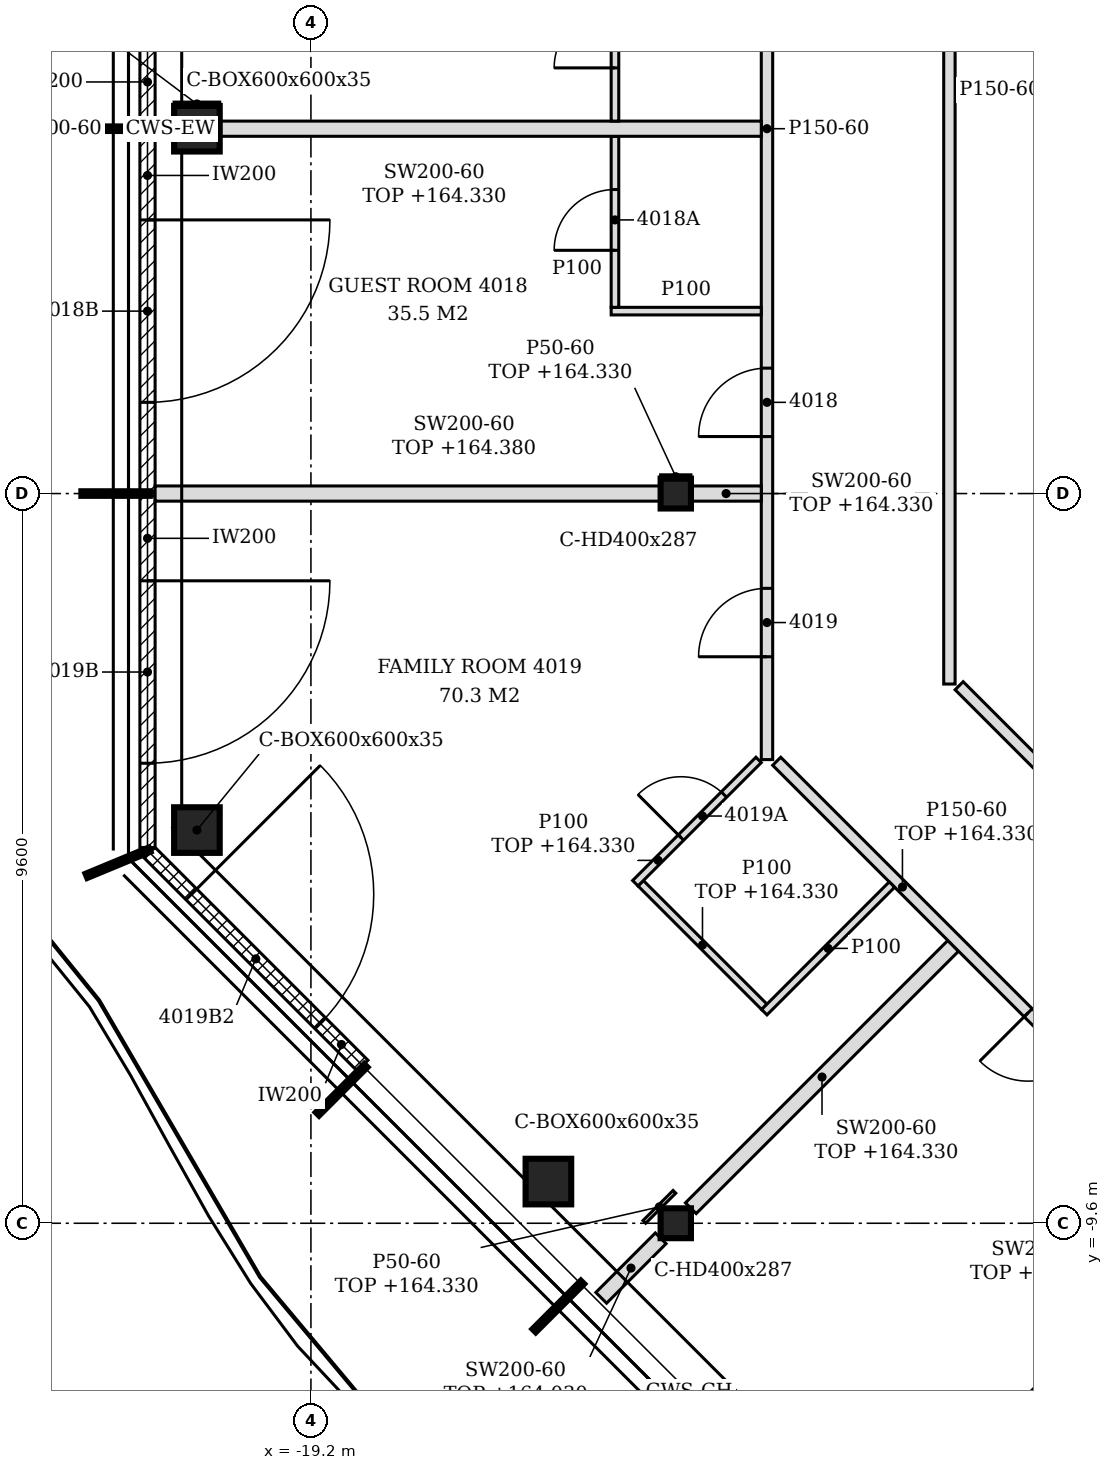
"""IFC4 building model, lengths in metres.
Left out: names, types, materials, properties, quantities, classifications, styles, units other than length and angle.
Written with IfcOpenShell. Run it as: python <this file> out.ifc"""

import sys

from ifc_helpers import new_model, si_unit, direction, frame, frame_2d, origin, origin_2d, place, context, subcontext, project, spatial, polyline, rectangle, hollow_rectangle, i_section, outline, extrude, element, fill, save


model = new_model("IFC4")
c1 = context("Model", 3, precision=1e-05, world=origin(), true_north=direction((0.0, 1.0)))
c2 = subcontext(c1, "Body", "Model", "MODEL_VIEW")
j1 = project(units=[si_unit("LENGTHUNIT", "METRE"), si_unit("PLANEANGLEUNIT", "RADIAN")], contexts=[c1])
p1 = place(None, origin())
s1 = spatial("IfcSite", under=j1, at=p1, CompositionType="ELEMENT")
p2 = place(p1, origin())
s2 = spatial("IfcBuilding", under=s1, at=p2, CompositionType="ELEMENT")
p3 = place(p2, frame((0.0, 0.0, 161.4)))
s3 = spatial("IfcBuildingStorey", under=s2, at=p3, CompositionType="ELEMENT", Elevation=161.4)
for number, where, z_axis, x_axis in (
    (1, (-20.7, 4.8, -0.15), (0.0, 0.0, 1.0), (1.0, 0.0, 0.0)),
    (2, (-20.7, -4.427, -0.15), (0.0, 0.0, 1.0), (1.0, 0.0, 0.0)),
    (3, (-16.076, -9.052, -0.15), (0.0, 0.0, 1.0), (1.0, 0.0, 0.0)),
):
    element("IfcColumn", number, at=place(p3, frame(where, z_axis=z_axis, x_axis=x_axis)), inside=s3, PredefinedType="COLUMN", context=c2, shape_type="SweptSolid", body=[
        extrude(hollow_rectangle(XDim=0.6, YDim=0.6, WallThickness=0.035, at=origin_2d()), origin(), (0.0, 0.0, 1.0), 3.6),
    ])
for number, where, z_axis, x_axis in (
    (4, (-14.4, -9.6, -0.15), (0.0, 0.0, 1.0), (1.0, 0.0, 0.0)),
    (5, (-14.4, 0.0, -0.15), (0.0, 0.0, 1.0), (1.0, 0.0, 0.0)),
):
    element("IfcColumn", number, at=place(p3, frame(where, z_axis=z_axis, x_axis=x_axis)), inside=s3, PredefinedType="COLUMN", context=c2, shape_type="SweptSolid", body=[
        extrude(i_section(OverallWidth=0.399, OverallDepth=0.393, WebThickness=0.023, FlangeThickness=0.037, FilletRadius=0.015, at=origin_2d()), origin(), (0.0, 0.0, 1.0), 3.6),
    ])
p4 = place(p3, frame((-21.35, 9.57, 0.0), z_axis=(0.0, 0.0, 1.0), x_axis=(0.0, -1.0, 0.0)))
e6 = element("IfcWall", 6, at=p4, inside=s3, PredefinedType="NOTDEFINED", context=c2, shape_type="SweptSolid", body=[
    extrude(rectangle(XDim=4.74, YDim=0.2, at=frame_2d((2.37, 0.0))), origin(), (0.0, 0.0, 1.0), 3.45),
])
p5 = place(p4, frame((1.17, 0.0, 0.0)))
e7 = element("IfcOpeningElement", 7, at=p5, cuts=e6, PredefinedType="OPENING", context=c2, shape_type="SweptSolid", body=[
    extrude(rectangle(XDim=2.4, YDim=2.4, at=frame_2d((1.2, 1.2))), frame((0.0, 0.11, 0.0), z_axis=(0.0, -1.0, 0.0), x_axis=(1.0, 0.0, 0.0)), (0.0, 0.0, 1.0), 0.22),
])
p6 = place(p3, frame((-21.35, 4.77, 0.0), z_axis=(0.0, 0.0, 1.0), x_axis=(0.0, -1.0, 0.0)))
e8 = element("IfcWall", 8, at=p6, inside=s3, PredefinedType="NOTDEFINED", context=c2, shape_type="SweptSolid", body=[
    extrude(rectangle(XDim=4.74, YDim=0.2, at=frame_2d((2.37, 0.0))), origin(), (0.0, 0.0, 1.0), 3.45),
])
p7 = place(p6, frame((1.17, 0.0, 0.0)))
e9 = element("IfcOpeningElement", 9, at=p7, cuts=e8, PredefinedType="OPENING", context=c2, shape_type="SweptSolid", body=[
    extrude(rectangle(XDim=2.4, YDim=2.4, at=frame_2d((1.2, 1.2))), frame((0.0, 0.11, 0.0), z_axis=(0.0, -1.0, 0.0), x_axis=(1.0, 0.0, 0.0)), (0.0, 0.0, 1.0), 0.22),
])
p8 = place(p3, frame((-21.35, -0.03, 0.0), z_axis=(0.0, 0.0, 1.0), x_axis=(0.0, -1.0, 0.0)))
e10 = element("IfcWall", 10, at=p8, inside=s3, PredefinedType="NOTDEFINED", context=c2, shape_type="SweptSolid", body=[
    extrude(rectangle(XDim=4.626, YDim=0.2, at=frame_2d((2.313, 0.0))), origin(), (0.0, 0.0, 1.0), 3.45),
])
p9 = place(p8, frame((1.118, 0.0, 0.0)))
e11 = element("IfcOpeningElement", 11, at=p9, cuts=e10, PredefinedType="OPENING", context=c2, shape_type="SweptSolid", body=[
    extrude(rectangle(XDim=2.4, YDim=2.4, at=frame_2d((1.2, 1.2))), frame((0.0, 0.11, 0.0), z_axis=(0.0, -1.0, 0.0), x_axis=(1.0, 0.0, 0.0)), (0.0, 0.0, 1.0), 0.22),
])
p10 = place(p3, frame((-21.322, -4.725, 0.0), z_axis=(0.0, 0.0, 1.0), x_axis=(0.707106781187, -0.707106781187, 0.0)))
e12 = element("IfcWall", 12, at=p10, inside=s3, PredefinedType="NOTDEFINED", context=c2, shape_type="SweptSolid", body=[
    extrude(rectangle(XDim=3.962, YDim=0.2, at=frame_2d((1.981, 0.0))), origin(), (0.0, 0.0, 1.0), 3.45),
])
p11 = place(p10, frame((0.775, 0.0, 0.0)))
e13 = element("IfcOpeningElement", 13, at=p11, cuts=e12, PredefinedType="OPENING", context=c2, shape_type="SweptSolid", body=[
    extrude(rectangle(XDim=2.4, YDim=2.4, at=frame_2d((1.2, 1.2))), frame((0.0, 0.11, 0.0), z_axis=(0.0, -1.0, 0.0), x_axis=(1.0, 0.0, 0.0)), (0.0, 0.0, 1.0), 0.22),
])
p12 = place(p3, frame((-11.152, -13.375, 0.0), z_axis=(0.0, 0.0, 1.0), x_axis=(0.707106781187, 0.707106781187, 0.0)))
e14 = element("IfcWall", 14, at=p12, inside=s3, PredefinedType="PARTITIONING", context=c2, shape_type="SweptSolid", body=[
    extrude(rectangle(XDim=6.83, YDim=0.2, at=frame_2d((3.415, 0.0))), origin(), (0.0, 0.0, 1.0), 2.93),
])
p13 = place(p3, frame((-15.381, -10.581, 0.0), z_axis=(0.0, 0.0, 1.0), x_axis=(0.707217034054, 0.706996511125, 0.0)))
e15 = element("IfcWall", 15, at=p13, inside=s3, PredefinedType="PARTITIONING", context=c2, shape_type="SweptSolid", body=[
    extrude(rectangle(XDim=1.107, YDim=0.2, at=frame_2d((0.554, 0.0))), origin(), (0.0, 0.0, 1.0), 2.63),
])
p14 = place(p3, frame((-14.202, -9.402, 0.0), z_axis=(0.0, 0.0, 1.0), x_axis=(0.707081776084, 0.707131785404, 0.0)))
e16 = element("IfcWall", 16, at=p14, inside=s3, PredefinedType="PARTITIONING", context=c2, shape_type="SweptSolid", body=[
    extrude(rectangle(XDim=4.882, YDim=0.2, at=frame_2d((2.441, 0.0))), origin(), (0.0, 0.0, 1.0), 2.93),
])
p15 = place(p3, frame((-8.322, -8.272, 0.0), z_axis=(0.0, 0.0, 1.0), x_axis=(-0.707106781187, 0.707106781187, 0.0)))
e17 = element("IfcWall", 17, at=p15, inside=s3, PredefinedType="PARTITIONING", context=c2, shape_type="SweptSolid", body=[
    extrude(rectangle(XDim=6.718, YDim=0.15, at=frame_2d((3.359, 0.0))), origin(), (0.0, 0.0, 1.0), 2.93),
])
p16 = place(p15, frame((1.139, 0.0, 0.0)))
e18 = element("IfcOpeningElement", 18, at=p16, cuts=e17, PredefinedType="OPENING", context=c2, shape_type="SweptSolid", body=[
    extrude(rectangle(XDim=0.9, YDim=2.1, at=frame_2d((0.45, 1.05))), frame((0.0, 0.085, 0.0), z_axis=(0.0, -1.0, 0.0), x_axis=(1.0, 0.0, 0.0)), (0.0, 0.0, 1.0), 0.17),
])
p17 = place(p3, frame((-13.235, -6.753, 0.0), z_axis=(0.0, 0.0, 1.0), x_axis=(-0.707106781187, 0.707106781187, 0.0)))
e19 = element("IfcWall", 19, at=p17, inside=s3, PredefinedType="PARTITIONING", context=c2, shape_type="SweptSolid", body=[
    extrude(rectangle(XDim=2.3, YDim=0.1, at=frame_2d((1.15, 0.0))), origin(), (0.0, 0.0, 1.0), 2.93),
])
p18 = place(p3, frame((-13.235, -6.823, 0.0), z_axis=(0.0, 0.0, 1.0), x_axis=(0.707106781187, 0.707106781187, 0.0)))
e20 = element("IfcWall", 20, at=p18, inside=s3, PredefinedType="PARTITIONING", context=c2, shape_type="SweptSolid", body=[
    extrude(rectangle(XDim=2.375, YDim=0.1, at=frame_2d((1.188, 0.0))), origin(), (0.0, 0.0, 1.0), 3.45),
])
p19 = place(p3, frame((-7.328, -5.872, 0.0), z_axis=(0.0, 0.0, 1.0), x_axis=(-0.707106781187, 0.707106781187, 0.0)))
e21 = element("IfcWall", 21, at=p19, inside=s3, PredefinedType="PARTITIONING", context=c2, shape_type="SweptSolid", body=[
    extrude(rectangle(XDim=4.729, YDim=0.15, at=frame_2d((2.365, 0.0))), origin(), (0.0, 0.0, 1.0), 2.93),
])
p20 = place(p3, frame((-14.932, -5.126, 0.0), z_axis=(0.0, 0.0, 1.0), x_axis=(0.707106781187, 0.707106781187, 0.0)))
e22 = element("IfcWall", 22, at=p20, inside=s3, PredefinedType="PARTITIONING", context=c2, shape_type="SweptSolid", body=[
    extrude(rectangle(XDim=2.294, YDim=0.1, at=frame_2d((1.147, 0.0))), origin(), (0.0, 0.0, 1.0), 2.93),
])
p21 = place(p20, frame((0.85, 0.0, 0.0)))
e23 = element("IfcOpeningElement", 23, at=p21, cuts=e22, PredefinedType="OPENING", context=c2, shape_type="SweptSolid", body=[
    extrude(rectangle(XDim=0.8, YDim=2.1, at=frame_2d((0.4, 1.05))), frame((0.0, 0.06, 0.0), z_axis=(0.0, -1.0, 0.0), x_axis=(1.0, 0.0, 0.0)), (0.0, 0.0, 1.0), 0.12),
])
p22 = place(p3, frame((-13.2, -3.5, 0.0), z_axis=(0.0, 0.0, 1.0), x_axis=(0.0, 1.0, 0.0)))
e24 = element("IfcWall", 24, at=p22, inside=s3, PredefinedType="PARTITIONING", context=c2, shape_type="SweptSolid", body=[
    extrude(outline(polyline([(0.0, 0.0), (17.634, 0.0), (17.634, 3.45), (13.2, 3.45), (13.198, 2.93), (13.0, 2.93), (12.998, 3.45), (8.4, 3.45), (8.398, 2.93), (8.2, 2.93), (8.198, 3.45), (3.6, 3.45), (3.598, 2.93), (3.4, 2.93), (3.398, 3.45), (0.0, 3.45), (0.0, 0.0)])), frame((0.0, 0.075, 0.0), z_axis=(0.0, -1.0, 0.0), x_axis=(1.0, 0.0, 0.0)), (0.0, 0.0, 1.0), 0.15),
])
p23 = place(p22, frame((15.784, 0.0, 0.0)))
e25 = element("IfcOpeningElement", 25, at=p23, cuts=e24, PredefinedType="OPENING", context=c2, shape_type="SweptSolid", body=[
    extrude(rectangle(XDim=0.9, YDim=2.1, at=frame_2d((0.45, 1.05))), frame((0.0, 0.085, 0.0), z_axis=(0.0, -1.0, 0.0), x_axis=(1.0, 0.0, 0.0)), (0.0, 0.0, 1.0), 0.17),
])
p24 = place(p22, frame((11.45, 0.0, 0.0)))
e26 = element("IfcOpeningElement", 26, at=p24, cuts=e24, PredefinedType="OPENING", context=c2, shape_type="SweptSolid", body=[
    extrude(rectangle(XDim=0.9, YDim=2.1, at=frame_2d((0.45, 1.05))), frame((0.0, 0.085, 0.0), z_axis=(0.0, -1.0, 0.0), x_axis=(1.0, 0.0, 0.0)), (0.0, 0.0, 1.0), 0.17),
])
p25 = place(p22, frame((4.25, 0.0, 0.0)))
e27 = element("IfcOpeningElement", 27, at=p25, cuts=e24, PredefinedType="OPENING", context=c2, shape_type="SweptSolid", body=[
    extrude(rectangle(XDim=0.9, YDim=2.1, at=frame_2d((0.45, 1.05))), frame((0.0, 0.085, 0.0), z_axis=(0.0, -1.0, 0.0), x_axis=(1.0, 0.0, 0.0)), (0.0, 0.0, 1.0), 0.17),
])
p26 = place(p22, frame((1.353, 0.0, 0.0)))
e28 = element("IfcOpeningElement", 28, at=p26, cuts=e24, PredefinedType="OPENING", context=c2, shape_type="SweptSolid", body=[
    extrude(rectangle(XDim=0.9, YDim=2.1, at=frame_2d((0.45, 1.05))), frame((0.0, 0.085, 0.0), z_axis=(0.0, -1.0, 0.0), x_axis=(1.0, 0.0, 0.0)), (0.0, 0.0, 1.0), 0.17),
])
p27 = place(p3, frame((-10.8, -2.506, 0.0), z_axis=(0.0, 0.0, 1.0), x_axis=(0.0, 1.0, 0.0)))
e29 = element("IfcWall", 29, at=p27, inside=s3, PredefinedType="PARTITIONING", context=c2, shape_type="SweptSolid", body=[
    extrude(outline(polyline([(0.0, 0.0), (15.631, 0.0), (15.631, 3.45), (12.206, 3.45), (12.204, 2.93), (12.006, 2.93), (12.004, 3.45), (7.406, 3.45), (7.404, 2.93), (7.206, 2.93), (7.204, 3.45), (2.606, 3.45), (2.604, 2.93), (2.406, 2.93), (2.404, 3.45), (0.0, 3.45), (0.0, 0.0)])), frame((0.0, 0.075, 0.0), z_axis=(0.0, -1.0, 0.0), x_axis=(1.0, 0.0, 0.0)), (0.0, 0.0, 1.0), 0.15),
])
p28 = place(p3, frame((-21.25, 0.0, 0.0), z_axis=(0.0, 0.0, 1.0), x_axis=(1.0, 0.0, 0.0)))
e30 = element("IfcWall", 30, at=p28, inside=s3, PredefinedType="PARTITIONING", context=c2, shape_type="SweptSolid", body=[
    extrude(outline(polyline([(0.0, 0.0), (6.65, 0.0), (6.65, 2.98), (0.7, 2.98), (0.698, 2.93), (0.4, 2.93), (0.398, 2.98), (0.0, 2.98), (0.0, 0.0)])), frame((0.0, 0.1, 0.0), z_axis=(0.0, -1.0, 0.0), x_axis=(1.0, 0.0, 0.0)), (0.0, 0.0, 1.0), 0.2),
])
p29 = place(p3, frame((-14.2, 0.0, 0.0), z_axis=(0.0, 0.0, 1.0), x_axis=(1.0, 0.0, 0.0)))
e31 = element("IfcWall", 31, at=p29, inside=s3, PredefinedType="PARTITIONING", context=c2, shape_type="SweptSolid", body=[
    extrude(rectangle(XDim=0.926, YDim=0.2, at=frame_2d((0.463, 0.0))), origin(), (0.0, 0.0, 1.0), 2.93),
])
p30 = place(p3, frame((-15.25, 2.4, 0.0), z_axis=(0.0, 0.0, 1.0), x_axis=(1.0, 0.0, 0.0)))
e32 = element("IfcWall", 32, at=p30, inside=s3, PredefinedType="PARTITIONING", context=c2, shape_type="SweptSolid", body=[
    extrude(outline(polyline([(0.0, 0.0), (1.975, 0.0), (1.975, 3.45), (1.0, 3.45), (0.998, 2.93), (0.7, 2.93), (0.698, 3.45), (0.0, 3.45), (0.0, 0.0)])), frame((0.0, 0.05, 0.0), z_axis=(0.0, -1.0, 0.0), x_axis=(1.0, 0.0, 0.0)), (0.0, 0.0, 1.0), 0.1),
])
p31 = place(p3, frame((-15.2, 2.45, 0.0), z_axis=(0.0, 0.0, 1.0), x_axis=(0.0, 1.0, 0.0)))
e33 = element("IfcWall", 33, at=p31, inside=s3, PredefinedType="PARTITIONING", context=c2, shape_type="SweptSolid", body=[
    extrude(rectangle(XDim=2.25, YDim=0.1, at=frame_2d((1.125, 0.0))), origin(), (0.0, 0.0, 1.0), 3.45),
])
p32 = place(p31, frame((0.75, 0.0, 0.0)))
e34 = element("IfcOpeningElement", 34, at=p32, cuts=e33, PredefinedType="OPENING", context=c2, shape_type="SweptSolid", body=[
    extrude(rectangle(XDim=0.8, YDim=2.1, at=frame_2d((0.4, 1.05))), frame((0.0, 0.06, 0.0), z_axis=(0.0, -1.0, 0.0), x_axis=(1.0, 0.0, 0.0)), (0.0, 0.0, 1.0), 0.12),
])
p33 = place(p3, frame((-21.25, 4.8, 0.0), z_axis=(0.0, 0.0, 1.0), x_axis=(1.0, 0.0, 0.0)))
e35 = element("IfcWall", 35, at=p33, inside=s3, PredefinedType="PARTITIONING", context=c2, shape_type="SweptSolid", body=[
    extrude(rectangle(XDim=0.25, YDim=0.2, at=frame_2d((0.125, 0.0))), origin(), (0.0, 0.0, 1.0), 3.45),
])
p34 = place(p3, frame((-20.4, 4.8, 0.0), z_axis=(0.0, 0.0, 1.0), x_axis=(1.0, 0.0, 0.0)))
e36 = element("IfcWall", 36, at=p34, inside=s3, PredefinedType="PARTITIONING", context=c2, shape_type="SweptSolid", body=[
    extrude(rectangle(XDim=7.125, YDim=0.2, at=frame_2d((3.562, 0.0))), origin(), (0.0, 0.0, 1.0), 2.93),
])
p35 = place(p3, frame((-15.2, 4.9, 0.0), z_axis=(0.0, 0.0, 1.0), x_axis=(0.0, 1.0, 0.0)))
e37 = element("IfcWall", 37, at=p35, inside=s3, PredefinedType="PARTITIONING", context=c2, shape_type="SweptSolid", body=[
    extrude(rectangle(XDim=2.25, YDim=0.1, at=frame_2d((1.125, 0.0))), origin(), (0.0, 0.0, 1.0), 3.45),
])
p36 = place(p35, frame((0.7, 0.0, 0.0)))
e38 = element("IfcOpeningElement", 38, at=p36, cuts=e37, PredefinedType="OPENING", context=c2, shape_type="SweptSolid", body=[
    extrude(rectangle(XDim=0.8, YDim=2.1, at=frame_2d((0.4, 1.05))), frame((0.0, 0.06, 0.0), z_axis=(0.0, -1.0, 0.0), x_axis=(1.0, 0.0, 0.0)), (0.0, 0.0, 1.0), 0.12),
])
p37 = place(p3, frame((-14.814, -9.582, 0.0), z_axis=(0.0, 0.0, 1.0), x_axis=(0.707106781187, 0.707106781187, 0.0)))
e39 = element("IfcWall", 39, at=p37, inside=s3, PredefinedType="PARTITIONING", context=c2, shape_type="SweptSolid", body=[
    extrude(rectangle(XDim=0.56, YDim=0.05, at=frame_2d((0.28, 0.0))), origin(), (0.0, 0.0, 1.0), 2.93),
])
p38 = place(p3, frame((-14.6, 0.221, 0.0), z_axis=(0.0, 0.0, 1.0), x_axis=(1.0, 0.0, 0.0)))
e40 = element("IfcWall", 40, at=p38, inside=s3, PredefinedType="PARTITIONING", context=c2, shape_type="SweptSolid", body=[
    extrude(rectangle(XDim=0.399, YDim=0.05, at=frame_2d((0.2, 0.0))), origin(), (0.0, 0.0, 1.0), 2.93),
])
p39 = place(p3, frame((-21.0, 5.125, 0.0), z_axis=(0.0, 0.0, 1.0), x_axis=(1.0, 0.0, 0.0)))
e41 = element("IfcWall", 41, at=p39, inside=s3, PredefinedType="PARTITIONING", context=c2, shape_type="SweptSolid", body=[
    extrude(rectangle(XDim=0.6, YDim=0.05, at=frame_2d((0.3, 0.0))), origin(), (0.0, 0.0, 1.0), 2.93),
])
p40 = place(p7, origin())
e42 = element("IfcDoor", 42, at=p40, inside=s3, OperationType="SINGLE_SWING_LEFT", PredefinedType="DOOR", context=c2, shape_type="SweptSolid", body=[
    extrude(rectangle(XDim=2.4, YDim=2.4, at=frame_2d((1.2, 1.2))), frame((0.0, 0.025, 0.0), z_axis=(0.0, -1.0, 0.0), x_axis=(1.0, 0.0, 0.0)), (0.0, 0.0, 1.0), 0.05),
])
fill(e9, e42)
p41 = place(p9, origin())
e43 = element("IfcDoor", 43, at=p41, inside=s3, OperationType="SINGLE_SWING_LEFT", PredefinedType="DOOR", context=c2, shape_type="SweptSolid", body=[
    extrude(rectangle(XDim=2.4, YDim=2.4, at=frame_2d((1.2, 1.2))), frame((0.0, 0.025, 0.0), z_axis=(0.0, -1.0, 0.0), x_axis=(1.0, 0.0, 0.0)), (0.0, 0.0, 1.0), 0.05),
])
fill(e11, e43)
p42 = place(p11, origin())
e44 = element("IfcDoor", 44, at=p42, inside=s3, OperationType="SINGLE_SWING_LEFT", PredefinedType="DOOR", context=c2, shape_type="SweptSolid", body=[
    extrude(rectangle(XDim=2.4, YDim=2.4, at=frame_2d((1.2, 1.2))), frame((0.0, 0.025, 0.0), z_axis=(0.0, -1.0, 0.0), x_axis=(1.0, 0.0, 0.0)), (0.0, 0.0, 1.0), 0.05),
])
fill(e13, e44)
p43 = place(p36, origin())
e45 = element("IfcDoor", 45, at=p43, inside=s3, OperationType="SINGLE_SWING_LEFT", PredefinedType="DOOR", context=c2, shape_type="SweptSolid", body=[
    extrude(rectangle(XDim=0.8, YDim=2.1, at=frame_2d((0.4, 1.05))), frame((0.0, 0.025, 0.0), z_axis=(0.0, -1.0, 0.0), x_axis=(1.0, 0.0, 0.0)), (0.0, 0.0, 1.0), 0.05),
])
fill(e38, e45)
p44 = place(p25, origin())
e46 = element("IfcDoor", 46, at=p44, inside=s3, OperationType="SINGLE_SWING_LEFT", PredefinedType="DOOR", context=c2, shape_type="SweptSolid", body=[
    extrude(rectangle(XDim=0.9, YDim=2.1, at=frame_2d((0.45, 1.05))), frame((0.0, 0.025, 0.0), z_axis=(0.0, -1.0, 0.0), x_axis=(1.0, 0.0, 0.0)), (0.0, 0.0, 1.0), 0.05),
])
fill(e27, e46)
p45 = place(p32, origin())
e47 = element("IfcDoor", 47, at=p45, inside=s3, OperationType="SINGLE_SWING_LEFT", PredefinedType="DOOR", context=c2, shape_type="SweptSolid", body=[
    extrude(rectangle(XDim=0.8, YDim=2.1, at=frame_2d((0.4, 1.05))), frame((0.0, 0.025, 0.0), z_axis=(0.0, -1.0, 0.0), x_axis=(1.0, 0.0, 0.0)), (0.0, 0.0, 1.0), 0.05),
])
fill(e34, e47)
p46 = place(p26, origin())
e48 = element("IfcDoor", 48, at=p46, inside=s3, OperationType="SINGLE_SWING_LEFT", PredefinedType="DOOR", context=c2, shape_type="SweptSolid", body=[
    extrude(rectangle(XDim=0.9, YDim=2.1, at=frame_2d((0.45, 1.05))), frame((0.0, 0.025, 0.0), z_axis=(0.0, -1.0, 0.0), x_axis=(1.0, 0.0, 0.0)), (0.0, 0.0, 1.0), 0.05),
])
fill(e28, e48)
p47 = place(p21, origin())
e49 = element("IfcDoor", 49, at=p47, inside=s3, OperationType="SINGLE_SWING_LEFT", PredefinedType="DOOR", context=c2, shape_type="SweptSolid", body=[
    extrude(rectangle(XDim=0.8, YDim=2.1, at=frame_2d((0.4, 1.05))), frame((0.0, 0.025, 0.0), z_axis=(0.0, -1.0, 0.0), x_axis=(1.0, 0.0, 0.0)), (0.0, 0.0, 1.0), 0.05),
])
fill(e23, e49)
p48 = place(p16, origin())
e50 = element("IfcDoor", 50, at=p48, inside=s3, OperationType="SINGLE_SWING_RIGHT", PredefinedType="DOOR", context=c2, shape_type="SweptSolid", body=[
    extrude(rectangle(XDim=0.9, YDim=2.1, at=frame_2d((0.45, 1.05))), frame((0.0, 0.025, 0.0), z_axis=(0.0, -1.0, 0.0), x_axis=(1.0, 0.0, 0.0)), (0.0, 0.0, 1.0), 0.05),
])
fill(e18, e50)
save(model, sys.argv[1])
